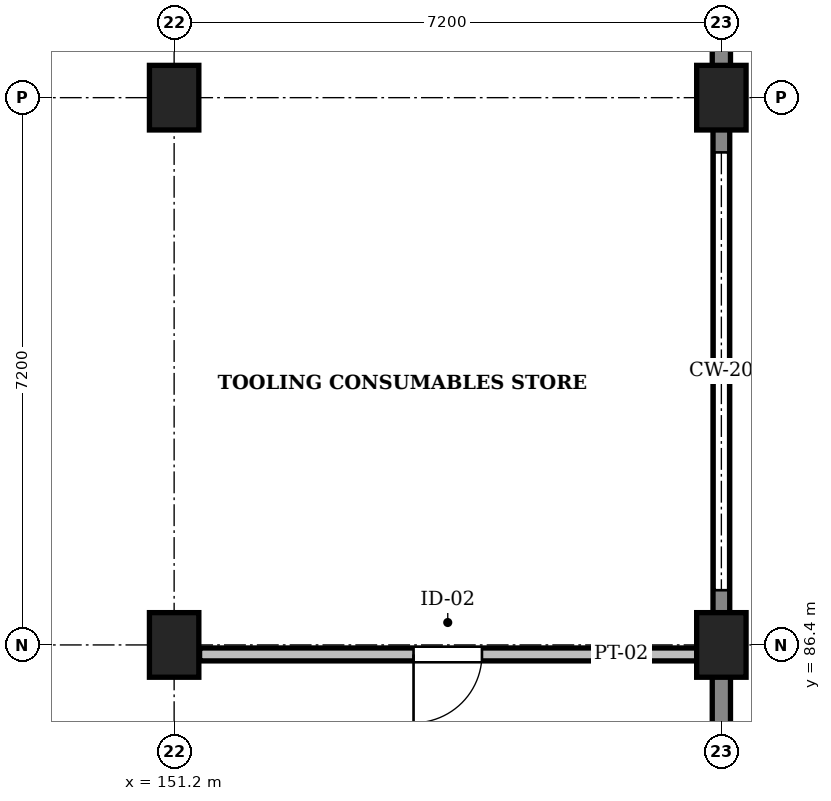
"""IFC4 building model, lengths in metres.
Left out: names, types, materials, properties, quantities, classifications, styles, units other than length and angle.
Written with IfcOpenShell. Run it as: python <this file> out.ifc"""

import sys

from ifc_helpers import new_model, si_unit, direction, frame, frame_2d, origin, origin_2d, place, context, subcontext, project, spatial, rectangle, extrude, element, fill, save


model = new_model("IFC4")
c1 = context("Model", 3, precision=1e-05, world=origin(), true_north=direction((0.0, 1.0)))
c2 = subcontext(c1, "Body", "Model", "MODEL_VIEW")
j1 = project(units=[si_unit("LENGTHUNIT", "METRE"), si_unit("PLANEANGLEUNIT", "RADIAN")], contexts=[c1])
p1 = place(None, origin())
s1 = spatial("IfcSite", under=j1, at=p1, CompositionType="ELEMENT")
p2 = place(p1, origin())
s2 = spatial("IfcBuilding", under=s1, at=p2, CompositionType="ELEMENT")
p3 = place(p2, frame((0.0, 0.0, 4.8)))
s3 = spatial("IfcBuildingStorey", under=s2, at=p3, CompositionType="ELEMENT", Elevation=4.8)
for number, where, z_axis, x_axis in (
    (1, (151.2, 86.4, 0.0), (0.0, 0.0, 1.0), (1.0, 0.0, 0.0)),
    (2, (151.2, 93.6, 0.0), (0.0, 0.0, 1.0), (1.0, 0.0, 0.0)),
    (3, (158.4, 86.4, 0.0), (0.0, 0.0, 1.0), (1.0, 0.0, 0.0)),
    (4, (158.4, 93.6, 0.0), (0.0, 0.0, 1.0), (1.0, 0.0, 0.0)),
):
    element("IfcColumn", number, at=place(p3, frame(where, z_axis=z_axis, x_axis=x_axis)), inside=s3, PredefinedType="COLUMN", context=c2, shape_type="SweptSolid", body=[
        extrude(rectangle(XDim=0.65, YDim=0.85, at=origin_2d()), origin(), (0.0, 0.0, 1.0), 4.8),
    ])
p4 = place(p3, frame((158.4, 100.8, 0.0), z_axis=(0.0, 0.0, 1.0), x_axis=(0.0, -1.0, 0.0)))
e5 = element("IfcWall", 5, at=p4, inside=s3, PredefinedType="SOLIDWALL", context=c2, shape_type="SweptSolid", body=[
    extrude(rectangle(XDim=7.2, YDim=0.24, at=frame_2d((3.6, 0.0))), origin(), (0.0, 0.0, 1.0), 4.52),
])
p5 = place(p4, frame((2.05, 0.0, 0.95)))
e6 = element("IfcOpeningElement", 6, at=p5, cuts=e5, PredefinedType="OPENING", context=c2, shape_type="SweptSolid", body=[
    extrude(rectangle(XDim=3.1, YDim=1.55, at=frame_2d((1.55, 0.775))), frame((0.0, 0.132, 0.0), z_axis=(0.0, -1.0, 0.0), x_axis=(1.0, 0.0, 0.0)), (0.0, 0.0, 1.0), 0.264),
])
p6 = place(p3, frame((158.4, 93.6, 0.0), z_axis=(0.0, 0.0, 1.0), x_axis=(0.0, -1.0, 0.0)))
e7 = element("IfcWall", 7, at=p6, inside=s3, PredefinedType="SOLIDWALL", context=c2, shape_type="SweptSolid", body=[
    extrude(rectangle(XDim=7.2, YDim=0.22, at=frame_2d((3.6, 0.0))), origin(), (0.0, 0.0, 1.0), 1.24),
])
p7 = place(p3, frame((158.4, 86.4, 0.0), z_axis=(0.0, 0.0, 1.0), x_axis=(0.0, -1.0, 0.0)))
e8 = element("IfcWall", 8, at=p7, inside=s3, PredefinedType="SOLIDWALL", context=c2, shape_type="SweptSolid", body=[
    extrude(rectangle(XDim=7.048, YDim=0.24, at=frame_2d((3.524, 0.0))), origin(), (0.0, 0.0, 1.0), 4.52),
])
p8 = place(p7, frame((1.849, 0.0, 0.95)))
e9 = element("IfcOpeningElement", 9, at=p8, cuts=e8, PredefinedType="OPENING", context=c2, shape_type="SweptSolid", body=[
    extrude(rectangle(XDim=3.35, YDim=1.55, at=frame_2d((1.675, 0.775))), frame((0.0, 0.132, 0.0), z_axis=(0.0, -1.0, 0.0), x_axis=(1.0, 0.0, 0.0)), (0.0, 0.0, 1.0), 0.264),
])
p9 = place(p3, frame((151.535, 86.275, 0.0), z_axis=(0.0, 0.0, 1.0), x_axis=(1.0, 0.0, 0.0)))
e10 = element("IfcWall", 10, at=p9, inside=s3, PredefinedType="PARTITIONING", context=c2, shape_type="SweptSolid", body=[
    extrude(rectangle(XDim=6.733, YDim=0.17, at=frame_2d((3.367, 0.0))), origin(), (0.0, 0.0, 1.0), 3.8),
])
p10 = place(p9, frame((2.815, 0.0, 0.0)))
e11 = element("IfcOpeningElement", 11, at=p10, cuts=e10, PredefinedType="OPENING", context=c2, shape_type="SweptSolid", body=[
    extrude(rectangle(XDim=0.9, YDim=2.08, at=frame_2d((0.45, 1.04))), frame((0.0, 0.097, 0.0), z_axis=(0.0, -1.0, 0.0), x_axis=(1.0, 0.0, 0.0)), (0.0, 0.0, 1.0), 0.194),
])
p11 = place(p10, frame((0.9, 0.0, 0.0), z_axis=(0.0, 0.0, 1.0), x_axis=(-1.0, 0.0, 0.0)))
e12 = element("IfcDoor", 12, at=p11, inside=s3, OperationType="SINGLE_SWING_RIGHT", PredefinedType="DOOR", context=c2, shape_type="SweptSolid", body=[
    extrude(rectangle(XDim=0.9, YDim=2.08, at=frame_2d((0.45, 1.04))), frame((0.0, 0.025, 0.0), z_axis=(0.0, -1.0, 0.0), x_axis=(1.0, 0.0, 0.0)), (0.0, 0.0, 1.0), 0.05),
])
fill(e11, e12)
save(model, sys.argv[1])
